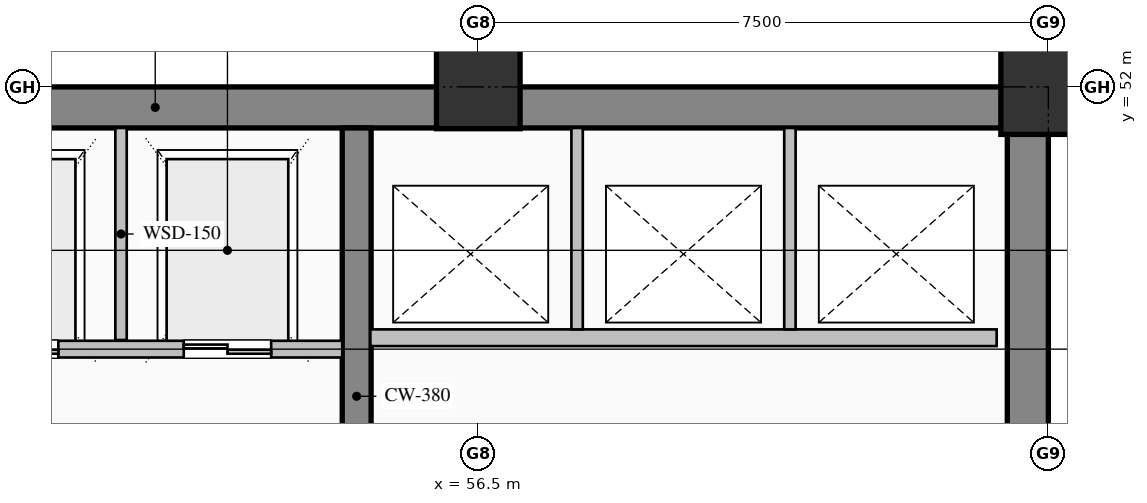
"""IFC4 building model, lengths in metres.
Left out: names, types, materials, properties, quantities, classifications, styles, units other than length and angle.
Written with IfcOpenShell. Run it as: python <this file> out.ifc"""

import sys

from ifc_helpers import new_model, si_unit, direction, frame, frame_2d, origin, origin_2d, place, context, subcontext, project, spatial, rectangle, hollow_rectangle, extrude, element, fill, save


model = new_model("IFC4")
c1 = context("Model", 3, precision=1e-05, world=origin(), true_north=direction((0.0, 1.0)))
c2 = subcontext(c1, "Body", "Model", "MODEL_VIEW")
j1 = project(units=[si_unit("LENGTHUNIT", "METRE"), si_unit("PLANEANGLEUNIT", "RADIAN")], contexts=[c1])
p1 = place(None, origin())
s1 = spatial("IfcSite", under=j1, at=p1, CompositionType="ELEMENT")
p2 = place(p1, origin())
s2 = spatial("IfcBuilding", under=s1, at=p2, CompositionType="ELEMENT")
p3 = place(p2, frame((0.0, 0.0, 48.2)))
s3 = spatial("IfcBuildingStorey", under=s2, at=p3, CompositionType="ELEMENT", Elevation=48.2)
p4 = place(p3, frame((40.5, 51.73, 0.0), z_axis=(0.0, 0.0, 1.0), x_axis=(1.0, 0.0, 0.0)))
e1 = element("IfcWall", 1, at=p4, inside=s3, PredefinedType="SHEAR", context=c2, shape_type="SweptSolid", body=[
    extrude(rectangle(XDim=23.5, YDim=0.54, at=frame_2d((11.75, 0.0))), origin(), (0.0, 0.0, 1.0), 3.75),
])
p5 = place(p3, frame((63.73, 36.32, 0.0), z_axis=(0.0, 0.0, 1.0), x_axis=(0.0, 1.0, 0.0)))
e2 = element("IfcWall", 2, at=p5, inside=s3, PredefinedType="SHEAR", context=c2, shape_type="SweptSolid", body=[
    extrude(rectangle(XDim=15.14, YDim=0.54, at=frame_2d((7.57, 0.0))), origin(), (0.0, 0.0, 1.0), 3.75),
])
p6 = place(p3, frame((54.9, 44.4, 0.0), z_axis=(0.0, 0.0, 1.0), x_axis=(0.0, 1.0, 0.0)))
e3 = element("IfcWall", 3, at=p6, inside=s3, PredefinedType="SHEAR", context=c2, shape_type="SweptSolid", body=[
    extrude(rectangle(XDim=7.06, YDim=0.38, at=frame_2d((3.53, 0.0))), origin(), (0.0, 0.0, 1.0), 3.75),
])
p7 = place(p3, frame((56.5, 52.0, 0.0), z_axis=(0.0, 0.0, 1.0), x_axis=(1.0, 0.0, 0.0)))
e4 = element("IfcColumn", 4, at=p7, inside=s3, PredefinedType="COLUMN", context=c2, shape_type="SweptSolid", body=[
    extrude(hollow_rectangle(XDim=1.1, YDim=1.1, WallThickness=0.04, at=origin_2d()), origin(), (0.0, 0.0, 1.0), 4.0),
])
p8 = place(p3, frame((64.0, 52.0, 0.0), z_axis=(0.0, 0.0, 1.0), x_axis=(1.0, 0.0, 0.0)))
e5 = element("IfcColumn", 5, at=p8, inside=s3, PredefinedType="COLUMN", context=c2, shape_type="SweptSolid", body=[
    extrude(hollow_rectangle(XDim=1.25, YDim=1.25, WallThickness=0.045, at=origin_2d()), origin(), (0.0, 0.0, 1.0), 4.0),
])
p9 = place(p3, frame((54.71, 48.55, 0.0), z_axis=(0.0, 0.0, 1.0), x_axis=(-1.0, 0.0, 0.0)))
e6 = element("IfcWall", 6, at=p9, inside=s3, PredefinedType="PARTITIONING", context=c2, shape_type="SweptSolid", body=[
    extrude(rectangle(XDim=5.12, YDim=0.22, at=frame_2d((2.56, 0.0))), origin(), (0.0, 0.0, 1.0), 3.75),
])
p10 = place(p9, frame((3.735, 0.0, 0.0)))
e7 = element("IfcOpeningElement", 7, at=p10, cuts=e6, PredefinedType="OPENING", context=c2, shape_type="SweptSolid", body=[
    extrude(rectangle(XDim=1.15, YDim=2.2, at=frame_2d((0.575, 1.1))), frame((0.0, 0.12, 0.0), z_axis=(0.0, -1.0, 0.0), x_axis=(1.0, 0.0, 0.0)), (0.0, 0.0, 1.0), 0.24),
])
p11 = place(p9, frame((0.935, 0.0, 0.0)))
e8 = element("IfcOpeningElement", 8, at=p11, cuts=e6, PredefinedType="OPENING", context=c2, shape_type="SweptSolid", body=[
    extrude(rectangle(XDim=1.15, YDim=2.2, at=frame_2d((0.575, 1.1))), frame((0.0, 0.12, 0.0), z_axis=(0.0, -1.0, 0.0), x_axis=(1.0, 0.0, 0.0)), (0.0, 0.0, 1.0), 0.24),
])
p12 = place(p3, frame((51.8, 48.67, 0.0), z_axis=(0.0, 0.0, 1.0), x_axis=(0.0, 1.0, 0.0)))
e9 = element("IfcWall", 9, at=p12, inside=s3, PredefinedType="PARTITIONING", context=c2, shape_type="SweptSolid", body=[
    extrude(rectangle(XDim=2.79, YDim=0.15, at=frame_2d((1.395, 0.0))), origin(), (0.0, 0.0, 1.0), 3.75),
])
p13 = place(p3, frame((63.32, 48.7, 0.0), z_axis=(0.0, 0.0, 1.0), x_axis=(-1.0, 0.0, 0.0)))
e10 = element("IfcWall", 10, at=p13, inside=s3, PredefinedType="PARTITIONING", context=c2, shape_type="SweptSolid", body=[
    extrude(rectangle(XDim=8.24, YDim=0.22, at=frame_2d((4.12, 0.0))), origin(), (0.0, 0.0, 1.0), 3.75),
])
for number, where, z_axis, x_axis in (
    (11, (57.8, 48.81, 0.0), (0.0, 0.0, 1.0), (0.0, 1.0, 0.0)),
    (12, (60.6, 48.81, 0.0), (0.0, 0.0, 1.0), (0.0, 1.0, 0.0)),
):
    element("IfcWall", number, at=place(p3, frame(where, z_axis=z_axis, x_axis=x_axis)), inside=s3, PredefinedType="PARTITIONING", context=c2, shape_type="SweptSolid", body=[
        extrude(rectangle(XDim=2.65, YDim=0.15, at=frame_2d((1.325, 0.0))), origin(), (0.0, 0.0, 1.0), 3.75),
    ])
p14 = place(p10, origin())
e13 = element("IfcDoor", 13, at=p14, inside=s3, OperationType="DOUBLE_DOOR_SLIDING", PredefinedType="DOOR", context=c2, shape_type="SweptSolid", body=[
    extrude(rectangle(XDim=1.15, YDim=2.2, at=frame_2d((0.575, 1.1))), frame((0.0, 0.025, 0.0), z_axis=(0.0, -1.0, 0.0), x_axis=(1.0, 0.0, 0.0)), (0.0, 0.0, 1.0), 0.05),
])
fill(e7, e13)
p15 = place(p11, origin())
e14 = element("IfcDoor", 14, at=p15, inside=s3, OperationType="DOUBLE_DOOR_SLIDING", PredefinedType="DOOR", context=c2, shape_type="SweptSolid", body=[
    extrude(rectangle(XDim=1.15, YDim=2.2, at=frame_2d((0.575, 1.1))), frame((0.0, 0.025, 0.0), z_axis=(0.0, -1.0, 0.0), x_axis=(1.0, 0.0, 0.0)), (0.0, 0.0, 1.0), 0.05),
])
fill(e8, e14)
save(model, sys.argv[1])
